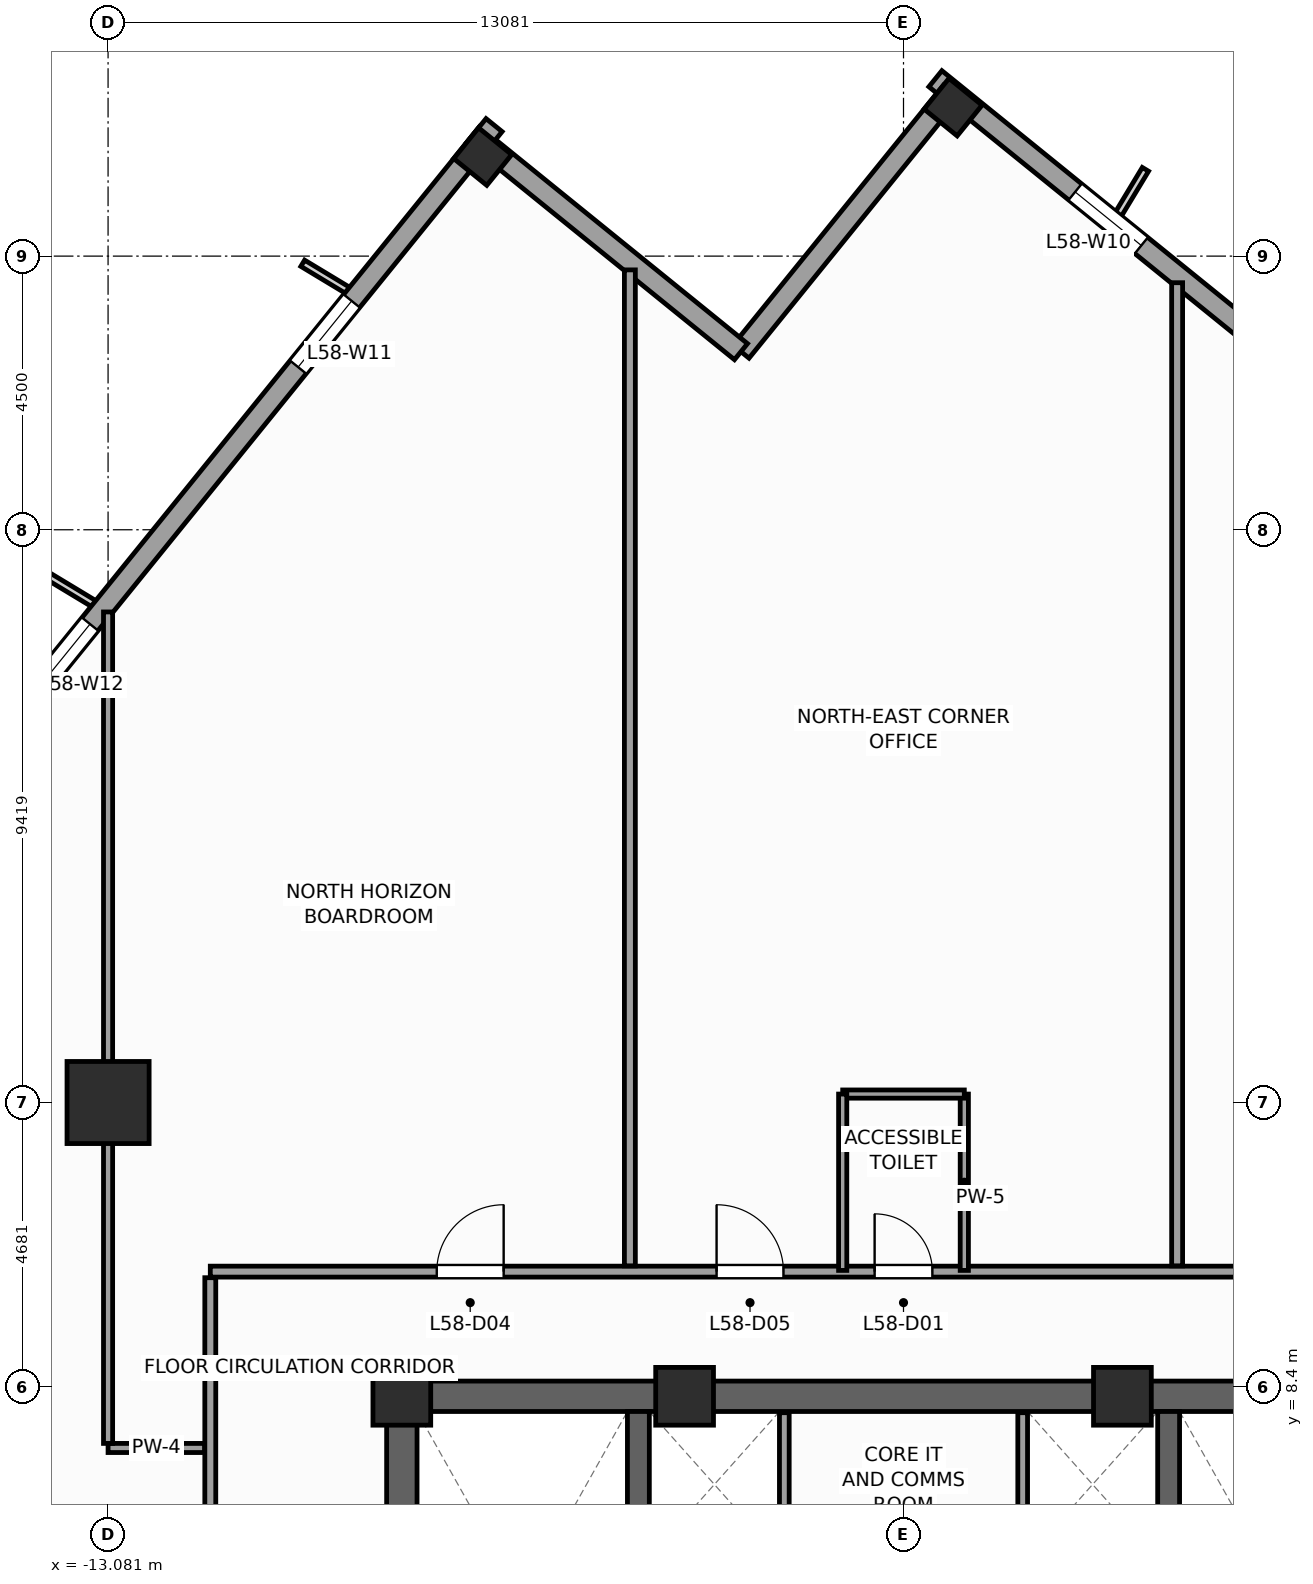
"""IFC4 building model, lengths in metres.
Left out: names, types, materials, properties, quantities, classifications, styles, units other than length and angle.
Written with IfcOpenShell. Run it as: python <this file> out.ifc"""

import sys

from ifc_helpers import new_model, si_unit, direction, frame, frame_2d, origin, origin_2d, place, context, subcontext, project, spatial, rectangle, extrude, source, transform, mapped, element, fill, save


model = new_model("IFC4")
c1 = context("Model", 3, precision=1e-05, world=origin(), true_north=direction((0.0, 1.0)))
c2 = subcontext(c1, "Body", "Model", "MODEL_VIEW")
j1 = project(units=[si_unit("LENGTHUNIT", "METRE"), si_unit("PLANEANGLEUNIT", "RADIAN")], contexts=[c1])
p1 = place(None, origin())
s1 = spatial("IfcSite", under=j1, at=p1, CompositionType="ELEMENT")
p2 = place(p1, origin())
s2 = spatial("IfcBuilding", under=s1, at=p2, CompositionType="ELEMENT")
p3 = place(p2, frame((0.0, 0.0, 240.7)))
s3 = spatial("IfcBuildingStorey", under=s2, at=p3, CompositionType="ELEMENT", Elevation=240.7)
p4 = place(p3, frame((-8.5, 8.25, 0.0), z_axis=(0.0, 0.0, 1.0), x_axis=(1.0, 0.0, 0.0)))
e1 = element("IfcWall", 1, at=p4, inside=s3, PredefinedType="SHEAR", context=c2, shape_type="SweptSolid", body=[
    extrude(rectangle(XDim=17.0, YDim=0.5, at=frame_2d((8.5, 0.0))), origin(), (0.0, 0.0, 1.0), 3.9),
])
p5 = place(p3, frame((-8.25, -8.0, 0.0), z_axis=(0.0, 0.0, 1.0), x_axis=(0.0, 1.0, 0.0)))
e2 = element("IfcWall", 2, at=p5, inside=s3, PredefinedType="SHEAR", context=c2, shape_type="SweptSolid", body=[
    extrude(rectangle(XDim=16.0, YDim=0.5, at=frame_2d((8.0, 0.0))), origin(), (0.0, 0.0, 1.0), 3.9),
])
p6 = place(p5, frame((4.69, 0.0, 0.0)))
e3 = element("IfcOpeningElement", 3, at=p6, cuts=e2, PredefinedType="OPENING", context=c2, shape_type="SweptSolid", body=[
    extrude(rectangle(XDim=1.3, YDim=2.2, at=frame_2d((0.65, 1.1))), frame((0.0, 0.26, 0.0), z_axis=(0.0, -1.0, 0.0), x_axis=(1.0, 0.0, 0.0)), (0.0, 0.0, 1.0), 0.52),
])
for number, where, z_axis, x_axis in (
    (4, (-4.36, -8.0, 0.0), (0.0, 0.0, 1.0), (0.0, 1.0, 0.0)),
    (5, (4.36, -8.0, 0.0), (0.0, 0.0, 1.0), (0.0, 1.0, 0.0)),
):
    element("IfcWall", number, at=place(p3, frame(where, z_axis=z_axis, x_axis=x_axis)), inside=s3, PredefinedType="SHEAR", context=c2, shape_type="SweptSolid", body=[
        extrude(rectangle(XDim=16.0, YDim=0.36, at=frame_2d((8.0, 0.0))), origin(), (0.0, 0.0, 1.0), 3.9),
    ])
m1 = source(origin(), c2, "Body", "SweptSolid", [
    extrude(rectangle(XDim=0.95, YDim=0.95, at=origin_2d()), origin(), (0.0, 0.0, 1.0), 3.9),
])
for number, where, z_axis, x_axis in (
    (6, (-8.25, 8.25, 0.0), (0.0, 0.0, 1.0), (1.0, 0.0, 0.0)),
    (7, (-3.6, 8.25, 0.0), (0.0, 0.0, 1.0), (1.0, 0.0, 0.0)),
    (8, (3.6, 8.25, 0.0), (0.0, 0.0, 1.0), (1.0, 0.0, 0.0)),
):
    element("IfcColumn", number, at=place(p3, frame(where, z_axis=z_axis, x_axis=x_axis)), inside=s3, PredefinedType="PILASTER", context=c2, shape_type="MappedRepresentation", body=[
        mapped(m1, transform((0.0, 0.0, 0.0), scale=1.0)),
    ])
m2 = source(origin(), c2, "Body", "SweptSolid", [
    extrude(rectangle(XDim=1.35, YDim=1.35, at=origin_2d()), origin(), (0.0, 0.0, 1.0), 3.9),
])
p7 = place(p3, frame((-13.081, 13.081, 0.0), z_axis=(0.0, 0.0, 1.0), x_axis=(1.0, 0.0, 0.0)))
e9 = element("IfcColumn", 9, at=p7, inside=s3, PredefinedType="COLUMN", context=c2, shape_type="MappedRepresentation", body=[
    mapped(m2, transform((0.0, 0.0, 0.0), scale=1.0)),
])
m3 = source(origin(), c2, "Body", "SweptSolid", [
    extrude(rectangle(XDim=0.65, YDim=0.7, at=origin_2d()), origin(), (0.0, 0.0, 1.0), 3.9),
])
for number, where, z_axis, x_axis in (
    (10, (0.815, 29.45, 0.0), (0.0, 0.0, 1.0), (0.629, 0.777, 0.0)),
    (11, (-6.92, 28.637, 0.0), (0.0, 0.0, 1.0), (0.629, 0.777, 0.0)),
):
    element("IfcColumn", number, at=place(p3, frame(where, z_axis=z_axis, x_axis=x_axis)), inside=s3, PredefinedType="COLUMN", context=c2, shape_type="MappedRepresentation", body=[
        mapped(m3, transform((0.0, 0.0, 0.0), scale=1.0)),
    ])
p8 = place(p3, frame((29.154, 6.733, 0.0), z_axis=(0.0, 0.0, 1.0), x_axis=(-0.77714192302, 0.629325378072, 0.0)))
e12 = element("IfcWall", 12, at=p8, inside=s3, PredefinedType="STANDARD", context=c2, shape_type="SweptSolid", body=[
    extrude(rectangle(XDim=36.84, YDim=0.34, at=frame_2d((18.42, 0.0))), origin(), (0.0, 0.0, 1.0), 2.96),
])
p9 = place(p8, frame((23.495, 0.0, 0.0)))
e13 = element("IfcOpeningElement", 13, at=p9, cuts=e12, PredefinedType="OPENING", context=c2, shape_type="SweptSolid", body=[
    extrude(rectangle(XDim=1.05, YDim=2.25, at=frame_2d((0.525, 1.125))), frame((0.0, 0.18, 0.0), z_axis=(0.0, -1.0, 0.0), x_axis=(1.0, 0.0, 0.0)), (0.0, 0.0, 1.0), 0.36),
])
p10 = place(p8, frame((3.721, 0.0, 0.48)))
e14 = element("IfcOpeningElement", 14, at=p10, cuts=e12, PredefinedType="OPENING", context=c2, shape_type="SweptSolid", body=[
    extrude(rectangle(XDim=1.4, YDim=2.4, at=frame_2d((0.7, 1.2))), frame((0.0, 0.18, 0.0), z_axis=(0.0, -1.0, 0.0), x_axis=(1.0, 0.0, 0.0)), (0.0, 0.0, 1.0), 0.36),
])
p11 = place(p8, frame((9.809, 0.0, 0.58)))
e15 = element("IfcOpeningElement", 15, at=p11, cuts=e12, PredefinedType="OPENING", context=c2, shape_type="SweptSolid", body=[
    extrude(rectangle(XDim=1.75, YDim=2.3, at=frame_2d((0.875, 1.15))), frame((0.0, 0.18, 0.0), z_axis=(0.0, -1.0, 0.0), x_axis=(1.0, 0.0, 0.0)), (0.0, 0.0, 1.0), 0.36),
])
p12 = place(p8, frame((16.058, 0.0, 0.58)))
e16 = element("IfcOpeningElement", 16, at=p12, cuts=e12, PredefinedType="OPENING", context=c2, shape_type="SweptSolid", body=[
    extrude(rectangle(XDim=1.75, YDim=2.3, at=frame_2d((0.875, 1.15))), frame((0.0, 0.18, 0.0), z_axis=(0.0, -1.0, 0.0), x_axis=(1.0, 0.0, 0.0)), (0.0, 0.0, 1.0), 0.36),
])
p13 = place(p8, frame((25.676, 0.0, 0.58)))
e17 = element("IfcOpeningElement", 17, at=p13, cuts=e12, PredefinedType="OPENING", context=c2, shape_type="SweptSolid", body=[
    extrude(rectangle(XDim=1.75, YDim=2.3, at=frame_2d((0.875, 1.15))), frame((0.0, 0.18, 0.0), z_axis=(0.0, -1.0, 0.0), x_axis=(1.0, 0.0, 0.0)), (0.0, 0.0, 1.0), 0.36),
])
p14 = place(p8, frame((32.482, 0.0, 0.48)))
e18 = element("IfcOpeningElement", 18, at=p14, cuts=e12, PredefinedType="OPENING", context=c2, shape_type="SweptSolid", body=[
    extrude(rectangle(XDim=1.4, YDim=2.4, at=frame_2d((0.7, 1.2))), frame((0.0, 0.18, 0.0), z_axis=(0.0, -1.0, 0.0), x_axis=(1.0, 0.0, 0.0)), (0.0, 0.0, 1.0), 0.36),
])
p15 = place(p3, frame((0.789, 29.703, 0.0), z_axis=(0.0, 0.0, 1.0), x_axis=(-0.629323365087, -0.77714355312, 0.0)))
e19 = element("IfcWall", 19, at=p15, inside=s3, PredefinedType="STANDARD", context=c2, shape_type="SweptSolid", body=[
    extrude(rectangle(XDim=5.5, YDim=0.34, at=frame_2d((2.75, 0.0))), origin(), (0.0, 0.0, 1.0), 3.66),
])
p16 = place(p3, frame((-2.673, 25.429, 0.0), z_axis=(0.0, 0.0, 1.0), x_axis=(-0.777162640055, 0.629299794138, 0.0)))
e20 = element("IfcWall", 20, at=p16, inside=s3, PredefinedType="STANDARD", context=c2, shape_type="SweptSolid", body=[
    extrude(rectangle(XDim=5.67, YDim=0.34, at=frame_2d((2.835, 0.0))), origin(), (0.0, 0.0, 1.0), 3.66),
])
p17 = place(p3, frame((-6.733, 29.154, 0.0), z_axis=(0.0, 0.0, 1.0), x_axis=(-0.629325378072, -0.77714192302, 0.0)))
e21 = element("IfcWall", 21, at=p17, inside=s3, PredefinedType="STANDARD", context=c2, shape_type="SweptSolid", body=[
    extrude(rectangle(XDim=36.84, YDim=0.34, at=frame_2d((18.42, 0.0))), origin(), (0.0, 0.0, 1.0), 2.96),
])
p18 = place(p17, frame((3.721, 0.0, 0.48)))
e22 = element("IfcOpeningElement", 22, at=p18, cuts=e21, PredefinedType="OPENING", context=c2, shape_type="SweptSolid", body=[
    extrude(rectangle(XDim=1.4, YDim=2.4, at=frame_2d((0.7, 1.2))), frame((0.0, 0.18, 0.0), z_axis=(0.0, -1.0, 0.0), x_axis=(1.0, 0.0, 0.0)), (0.0, 0.0, 1.0), 0.36),
])
p19 = place(p17, frame((10.559, 0.0, 0.58)))
e23 = element("IfcOpeningElement", 23, at=p19, cuts=e21, PredefinedType="OPENING", context=c2, shape_type="SweptSolid", body=[
    extrude(rectangle(XDim=1.75, YDim=2.3, at=frame_2d((0.875, 1.15))), frame((0.0, 0.18, 0.0), z_axis=(0.0, -1.0, 0.0), x_axis=(1.0, 0.0, 0.0)), (0.0, 0.0, 1.0), 0.36),
])
p20 = place(p17, frame((16.058, 0.0, 0.58)))
e24 = element("IfcOpeningElement", 24, at=p20, cuts=e21, PredefinedType="OPENING", context=c2, shape_type="SweptSolid", body=[
    extrude(rectangle(XDim=1.75, YDim=2.3, at=frame_2d((0.875, 1.15))), frame((0.0, 0.18, 0.0), z_axis=(0.0, -1.0, 0.0), x_axis=(1.0, 0.0, 0.0)), (0.0, 0.0, 1.0), 0.36),
])
p21 = place(p17, frame((24.176, 0.0, 0.58)))
e25 = element("IfcOpeningElement", 25, at=p21, cuts=e21, PredefinedType="OPENING", context=c2, shape_type="SweptSolid", body=[
    extrude(rectangle(XDim=1.75, YDim=2.3, at=frame_2d((0.875, 1.15))), frame((0.0, 0.18, 0.0), z_axis=(0.0, -1.0, 0.0), x_axis=(1.0, 0.0, 0.0)), (0.0, 0.0, 1.0), 0.36),
])
p22 = place(p17, frame((30.982, 0.0, 0.48)))
e26 = element("IfcOpeningElement", 26, at=p22, cuts=e21, PredefinedType="OPENING", context=c2, shape_type="SweptSolid", body=[
    extrude(rectangle(XDim=1.4, YDim=2.4, at=frame_2d((0.7, 1.2))), frame((0.0, 0.18, 0.0), z_axis=(0.0, -1.0, 0.0), x_axis=(1.0, 0.0, 0.0)), (0.0, 0.0, 1.0), 0.36),
])
for number, where, z_axis, x_axis in (
    (27, (-1.96, 4.58, 0.0), (0.0, 0.0, 1.0), (0.0, 1.0, 0.0)),
    (28, (1.96, 4.58, 0.0), (0.0, 0.0, 1.0), (0.0, 1.0, 0.0)),
):
    element("IfcWall", number, at=place(p3, frame(where, z_axis=z_axis, x_axis=x_axis)), inside=s3, PredefinedType="PARTITIONING", context=c2, shape_type="SweptSolid", body=[
        extrude(rectangle(XDim=3.4, YDim=0.16, at=frame_2d((1.7, 0.0))), origin(), (0.0, 0.0, 1.0), 3.66),
    ])
p23 = place(p3, frame((-11.4, 10.3, 0.0), z_axis=(0.0, 0.0, 1.0), x_axis=(1.0, 0.0, 0.0)))
e29 = element("IfcWall", 29, at=p23, inside=s3, PredefinedType="PARTITIONING", context=c2, shape_type="SweptSolid", body=[
    extrude(rectangle(XDim=21.7, YDim=0.18, at=frame_2d((10.85, 0.0))), origin(), (0.0, 0.0, 1.0), 3.66),
])
p24 = place(p23, frame((10.925, 0.0, 0.0)))
e30 = element("IfcOpeningElement", 30, at=p24, cuts=e29, PredefinedType="OPENING", context=c2, shape_type="SweptSolid", body=[
    extrude(rectangle(XDim=0.95, YDim=2.1, at=frame_2d((0.475, 1.05))), frame((0.0, 0.1, 0.0), z_axis=(0.0, -1.0, 0.0), x_axis=(1.0, 0.0, 0.0)), (0.0, 0.0, 1.0), 0.2),
])
p25 = place(p23, frame((3.724, 0.0, 0.0)))
e31 = element("IfcOpeningElement", 31, at=p25, cuts=e29, PredefinedType="OPENING", context=c2, shape_type="SweptSolid", body=[
    extrude(rectangle(XDim=1.1, YDim=2.2, at=frame_2d((0.55, 1.1))), frame((0.0, 0.1, 0.0), z_axis=(0.0, -1.0, 0.0), x_axis=(1.0, 0.0, 0.0)), (0.0, 0.0, 1.0), 0.2),
])
p26 = place(p23, frame((8.326, 0.0, 0.0)))
e32 = element("IfcOpeningElement", 32, at=p26, cuts=e29, PredefinedType="OPENING", context=c2, shape_type="SweptSolid", body=[
    extrude(rectangle(XDim=1.1, YDim=2.2, at=frame_2d((0.55, 1.1))), frame((0.0, 0.1, 0.0), z_axis=(0.0, -1.0, 0.0), x_axis=(1.0, 0.0, 0.0)), (0.0, 0.0, 1.0), 0.2),
])
p27 = place(p23, frame((18.085, 0.0, 0.0)))
e33 = element("IfcOpeningElement", 33, at=p27, cuts=e29, PredefinedType="OPENING", context=c2, shape_type="SweptSolid", body=[
    extrude(rectangle(XDim=1.1, YDim=2.2, at=frame_2d((0.55, 1.1))), frame((0.0, 0.1, 0.0), z_axis=(0.0, -1.0, 0.0), x_axis=(1.0, 0.0, 0.0)), (0.0, 0.0, 1.0), 0.2),
])
p28 = place(p3, frame((-11.4, -10.2, 0.0), z_axis=(0.0, 0.0, 1.0), x_axis=(0.0, 1.0, 0.0)))
e34 = element("IfcWall", 34, at=p28, inside=s3, PredefinedType="PARTITIONING", context=c2, shape_type="SweptSolid", body=[
    extrude(rectangle(XDim=20.4, YDim=0.18, at=frame_2d((10.2, 0.0))), origin(), (0.0, 0.0, 1.0), 3.66),
])
p29 = place(p28, frame((14.85, 0.0, 0.0)))
e35 = element("IfcOpeningElement", 35, at=p29, cuts=e34, PredefinedType="OPENING", context=c2, shape_type="SweptSolid", body=[
    extrude(rectangle(XDim=1.1, YDim=2.2, at=frame_2d((0.55, 1.1))), frame((0.0, 0.1, 0.0), z_axis=(0.0, -1.0, 0.0), x_axis=(1.0, 0.0, 0.0)), (0.0, 0.0, 1.0), 0.2),
])
p30 = place(p28, frame((4.7, 0.0, 0.0)))
e36 = element("IfcOpeningElement", 36, at=p30, cuts=e34, PredefinedType="OPENING", context=c2, shape_type="SweptSolid", body=[
    extrude(rectangle(XDim=1.1, YDim=2.2, at=frame_2d((0.55, 1.1))), frame((0.0, 0.1, 0.0), z_axis=(0.0, -1.0, 0.0), x_axis=(1.0, 0.0, 0.0)), (0.0, 0.0, 1.0), 0.2),
])
p31 = place(p28, frame((9.9, 0.0, 0.0)))
e37 = element("IfcOpeningElement", 37, at=p31, cuts=e34, PredefinedType="OPENING", context=c2, shape_type="SweptSolid", body=[
    extrude(rectangle(XDim=1.1, YDim=2.2, at=frame_2d((0.55, 1.1))), frame((0.0, 0.1, 0.0), z_axis=(0.0, -1.0, 0.0), x_axis=(1.0, 0.0, 0.0)), (0.0, 0.0, 1.0), 0.2),
])
p32 = place(p3, frame((-4.5, 10.395, 0.0), z_axis=(0.0, 0.0, 1.0), x_axis=(0.0, 1.0, 0.0)))
e38 = element("IfcWall", 38, at=p32, inside=s3, PredefinedType="PARTITIONING", context=c2, shape_type="SweptSolid", body=[
    extrude(rectangle(XDim=16.378, YDim=0.18, at=frame_2d((8.189, 0.0))), origin(), (0.0, 0.0, 1.0), 3.66),
])
p33 = place(p3, frame((4.5, 10.395, 0.0), z_axis=(0.0, 0.0, 1.0), x_axis=(0.0, 1.0, 0.0)))
e39 = element("IfcWall", 39, at=p33, inside=s3, PredefinedType="PARTITIONING", context=c2, shape_type="SweptSolid", body=[
    extrude(rectangle(XDim=16.168, YDim=0.18, at=frame_2d((8.084, 0.0))), origin(), (0.0, 0.0, 1.0), 3.66),
])
p34 = place(p3, frame((-11.495, 7.4, 0.0), z_axis=(0.0, 0.0, 1.0), x_axis=(-1.0, 0.0, 0.0)))
e40 = element("IfcWall", 40, at=p34, inside=s3, PredefinedType="PARTITIONING", context=c2, shape_type="SweptSolid", body=[
    extrude(rectangle(XDim=1.586, YDim=0.15, at=frame_2d((0.793, 0.0))), origin(), (0.0, 0.0, 1.0), 3.66),
])
p35 = place(p3, frame((-13.081, 7.475, 0.0), z_axis=(0.0, 0.0, 1.0), x_axis=(0.0, 1.0, 0.0)))
e41 = element("IfcWall", 41, at=p35, inside=s3, PredefinedType="PARTITIONING", context=c2, shape_type="SweptSolid", body=[
    extrude(rectangle(XDim=13.673, YDim=0.15, at=frame_2d((6.837, 0.0))), origin(), (0.0, 0.0, 1.0), 2.76),
])
p36 = place(p3, frame((1.0, 10.32, 0.0), z_axis=(0.0, 0.0, 1.0), x_axis=(0.0, 1.0, 0.0)))
e42 = element("IfcWall", 42, at=p36, inside=s3, PredefinedType="PARTITIONING", context=c2, shape_type="SweptSolid", body=[
    extrude(rectangle(XDim=2.9, YDim=0.135, at=frame_2d((1.45, 0.0))), origin(), (0.0, 0.0, 1.0), 3.66),
])
p37 = place(p3, frame((-1.0, 13.22, 0.0), z_axis=(0.0, 0.0, 1.0), x_axis=(1.0, 0.0, 0.0)))
e43 = element("IfcWall", 43, at=p37, inside=s3, PredefinedType="PARTITIONING", context=c2, shape_type="SweptSolid", body=[
    extrude(rectangle(XDim=2.0, YDim=0.135, at=frame_2d((1.0, 0.0))), origin(), (0.0, 0.0, 1.0), 2.76),
])
p38 = place(p3, frame((-1.0, 10.32, 0.0), z_axis=(0.0, 0.0, 1.0), x_axis=(0.0, 1.0, 0.0)))
e44 = element("IfcWall", 44, at=p38, inside=s3, PredefinedType="PARTITIONING", context=c2, shape_type="SweptSolid", body=[
    extrude(rectangle(XDim=2.9, YDim=0.135, at=frame_2d((1.45, 0.0))), origin(), (0.0, 0.0, 1.0), 3.66),
])
m4 = source(origin(), c2, "Body", "SweptSolid", [
    extrude(rectangle(XDim=1.4, YDim=2.4, at=frame_2d((0.7, 1.2))), frame((0.0, 0.03, 0.0), z_axis=(0.0, -1.0, 0.0), x_axis=(1.0, 0.0, 0.0)), (0.0, 0.0, 1.0), 0.06),
])
p39 = place(p14, origin())
e45 = element("IfcWindow", 45, at=p39, inside=s3, PartitioningType="SINGLE_PANEL", PredefinedType="WINDOW", context=c2, shape_type="MappedRepresentation", body=[
    mapped(m4, transform((0.0, 0.0, 0.0), scale=1.0)),
])
fill(e18, e45)
p40 = place(p18, origin())
e46 = element("IfcWindow", 46, at=p40, inside=s3, PartitioningType="SINGLE_PANEL", PredefinedType="WINDOW", context=c2, shape_type="MappedRepresentation", body=[
    mapped(m4, transform((0.0, 0.0, 0.0), scale=1.0)),
])
fill(e22, e46)
m5 = source(origin(), c2, "Body", "SweptSolid", [
    extrude(rectangle(XDim=1.75, YDim=2.3, at=frame_2d((0.875, 1.15))), frame((0.0, 0.03, 0.0), z_axis=(0.0, -1.0, 0.0), x_axis=(1.0, 0.0, 0.0)), (0.0, 0.0, 1.0), 0.06),
])
p41 = place(p19, origin())
e47 = element("IfcWindow", 47, at=p41, inside=s3, PartitioningType="SINGLE_PANEL", PredefinedType="WINDOW", context=c2, shape_type="MappedRepresentation", body=[
    mapped(m5, transform((0.0, 0.0, 0.0), scale=1.0)),
])
fill(e23, e47)
m6 = source(origin(), c2, "Body", "SweptSolid", [
    extrude(rectangle(XDim=0.95, YDim=2.1, at=frame_2d((0.475, 1.05))), frame((0.0, 0.025, 0.0), z_axis=(0.0, -1.0, 0.0), x_axis=(1.0, 0.0, 0.0)), (0.0, 0.0, 1.0), 0.05),
])
p42 = place(p24, origin())
e48 = element("IfcDoor", 48, at=p42, inside=s3, OperationType="SINGLE_SWING_LEFT", PredefinedType="DOOR", context=c2, shape_type="MappedRepresentation", body=[
    mapped(m6, transform((0.0, 0.0, 0.0), scale=1.0)),
])
fill(e30, e48)
m7 = source(origin(), c2, "Body", "SweptSolid", [
    extrude(rectangle(XDim=1.1, YDim=2.2, at=frame_2d((0.55, 1.1))), frame((0.0, 0.025, 0.0), z_axis=(0.0, -1.0, 0.0), x_axis=(1.0, 0.0, 0.0)), (0.0, 0.0, 1.0), 0.05),
])
p43 = place(p25, origin())
e49 = element("IfcDoor", 49, at=p43, inside=s3, OperationType="SINGLE_SWING_RIGHT", PredefinedType="DOOR", context=c2, shape_type="MappedRepresentation", body=[
    mapped(m7, transform((0.0, 0.0, 0.0), scale=1.0)),
])
fill(e31, e49)
p44 = place(p26, origin())
e50 = element("IfcDoor", 50, at=p44, inside=s3, OperationType="SINGLE_SWING_LEFT", PredefinedType="DOOR", context=c2, shape_type="MappedRepresentation", body=[
    mapped(m7, transform((0.0, 0.0, 0.0), scale=1.0)),
])
fill(e32, e50)
save(model, sys.argv[1])
